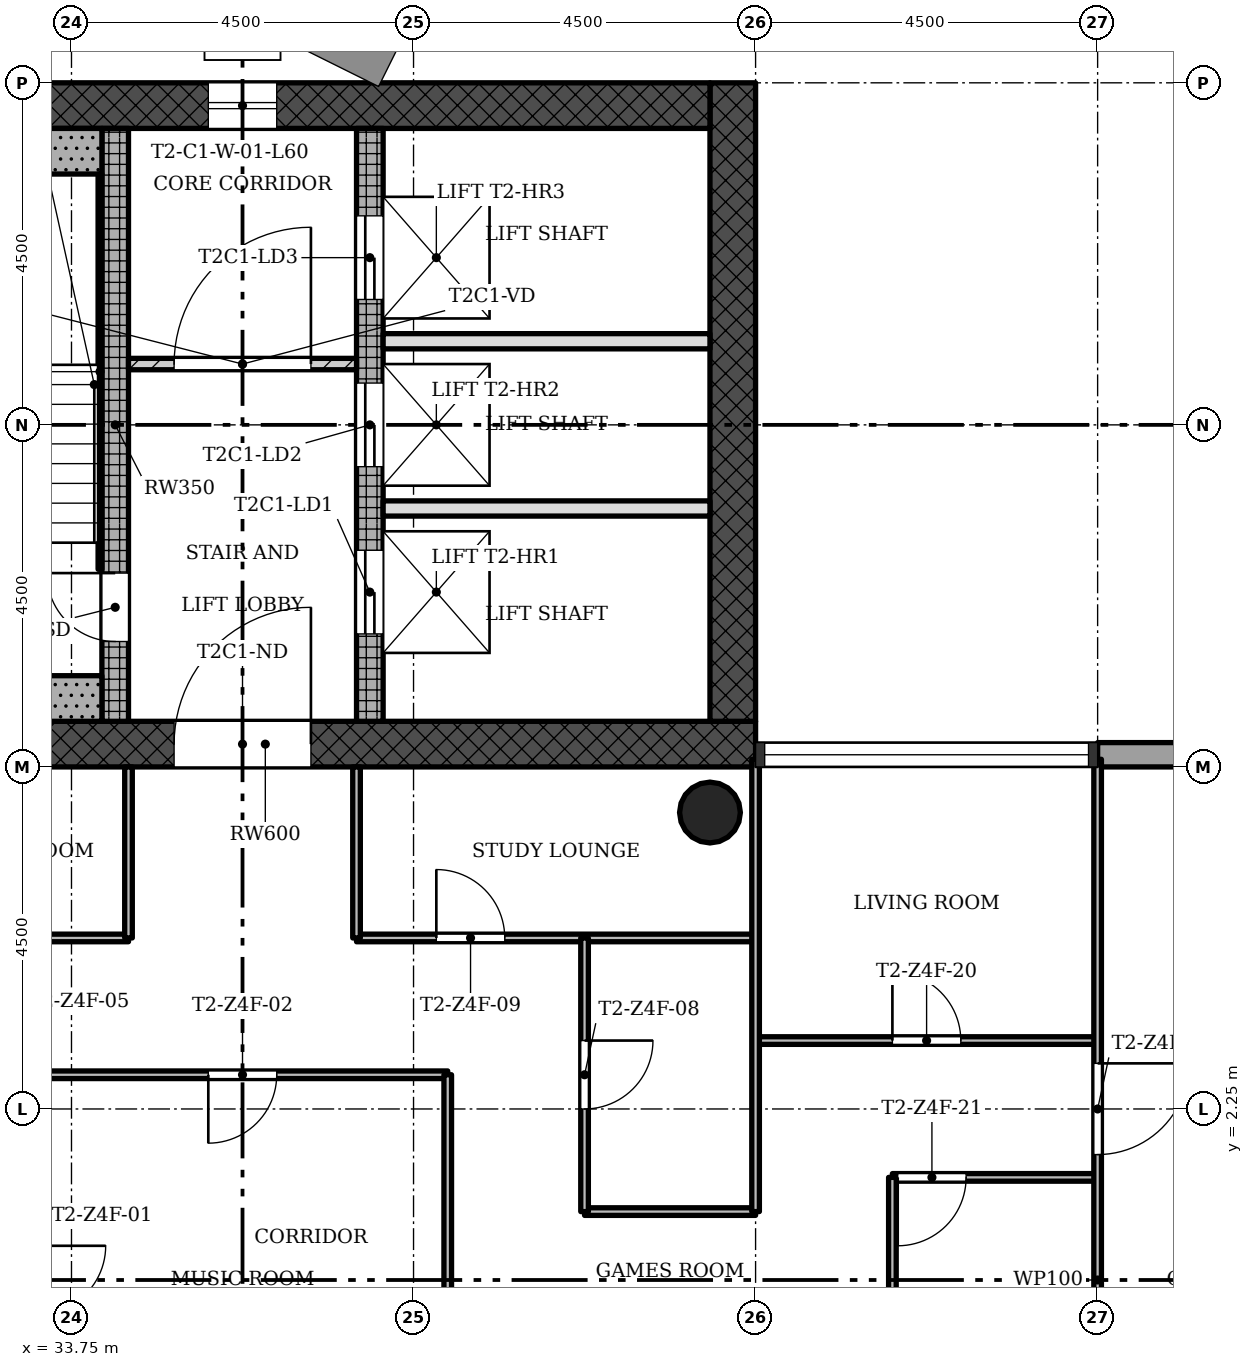
"""IFC4 building model, lengths in metres.
Left out: names, types, materials, properties, quantities, classifications, styles, units other than length and angle.
Written with IfcOpenShell. Run it as: python <this file> out.ifc"""

import sys

from ifc_helpers import new_model, si_unit, direction, frame, frame_2d, origin, origin_2d, place, context, subcontext, project, spatial, rectangle, hollow_circle, extrude, element, fill, save


model = new_model("IFC4")
c1 = context("Model", 3, precision=1e-05, world=origin(), true_north=direction((0.0, 1.0)))
c2 = subcontext(c1, "Body", "Model", "MODEL_VIEW")
j1 = project(units=[si_unit("LENGTHUNIT", "METRE"), si_unit("PLANEANGLEUNIT", "RADIAN")], contexts=[c1])
p1 = place(None, origin())
s1 = spatial("IfcSite", under=j1, at=p1, CompositionType="ELEMENT")
p2 = place(p1, origin())
s2 = spatial("IfcBuilding", under=s1, at=p2, CompositionType="ELEMENT")
p3 = place(p2, frame((0.0, 0.0, 216.4)))
s3 = spatial("IfcBuildingStorey", under=s2, at=p3, CompositionType="ELEMENT", Elevation=216.4)
p4 = place(p3, frame((29.85, 7.05, 0.0), z_axis=(0.0, 0.0, 1.0), x_axis=(1.0, 0.0, 0.0)))
e1 = element("IfcWall", 1, at=p4, inside=s3, PredefinedType="SHEAR", context=c2, shape_type="SweptSolid", body=[
    extrude(rectangle(XDim=12.9, YDim=0.6, at=frame_2d((6.45, 0.0))), origin(), (0.0, 0.0, 1.0), 3.4),
])
p5 = place(p4, frame((5.25, 0.0, 0.0)))
e2 = element("IfcOpeningElement", 2, at=p5, cuts=e1, PredefinedType="OPENING", context=c2, shape_type="SweptSolid", body=[
    extrude(rectangle(XDim=1.8, YDim=2.1, at=frame_2d((0.9, 1.05))), frame((0.0, 0.31, 0.0), z_axis=(0.0, -1.0, 0.0), x_axis=(1.0, 0.0, 0.0)), (0.0, 0.0, 1.0), 0.62),
])
p6 = place(p3, frame((42.45, 7.35, 0.0), z_axis=(0.0, 0.0, 1.0), x_axis=(0.0, 1.0, 0.0)))
e3 = element("IfcWall", 3, at=p6, inside=s3, PredefinedType="SHEAR", context=c2, shape_type="SweptSolid", body=[
    extrude(rectangle(XDim=8.4, YDim=0.6, at=frame_2d((4.2, 0.0))), origin(), (0.0, 0.0, 1.0), 3.4),
])
p7 = place(p3, frame((42.15, 15.45, 0.0), z_axis=(0.0, 0.0, 1.0), x_axis=(-1.0, 0.0, 0.0)))
e4 = element("IfcWall", 4, at=p7, inside=s3, PredefinedType="SHEAR", context=c2, shape_type="SweptSolid", body=[
    extrude(rectangle(XDim=12.9, YDim=0.6, at=frame_2d((6.45, 0.0))), origin(), (0.0, 0.0, 1.0), 3.4),
])
p8 = place(p7, frame((5.7, 0.0, 0.45)))
e5 = element("IfcOpeningElement", 5, at=p8, cuts=e4, PredefinedType="OPENING", context=c2, shape_type="SweptSolid", body=[
    extrude(rectangle(XDim=0.9, YDim=2.4, at=frame_2d((0.45, 1.2))), frame((0.0, 0.31, 0.0), z_axis=(0.0, -1.0, 0.0), x_axis=(1.0, 0.0, 0.0)), (0.0, 0.0, 1.0), 0.62),
])
p9 = place(p3, frame((34.325, 7.35, 0.0), z_axis=(0.0, 0.0, 1.0), x_axis=(0.0, 1.0, 0.0)))
e6 = element("IfcWall", 6, at=p9, inside=s3, PredefinedType="SHEAR", context=c2, shape_type="SweptSolid", body=[
    extrude(rectangle(XDim=7.8, YDim=0.35, at=frame_2d((3.9, 0.0))), origin(), (0.0, 0.0, 1.0), 3.4),
])
p10 = place(p9, frame((1.05, 0.0, 0.0)))
e7 = element("IfcOpeningElement", 7, at=p10, cuts=e6, PredefinedType="OPENING", context=c2, shape_type="SweptSolid", body=[
    extrude(rectangle(XDim=0.9, YDim=2.1, at=frame_2d((0.45, 1.05))), frame((0.0, 0.185, 0.0), z_axis=(0.0, -1.0, 0.0), x_axis=(1.0, 0.0, 0.0)), (0.0, 0.0, 1.0), 0.37),
])
p11 = place(p3, frame((37.675, 7.35, 0.0), z_axis=(0.0, 0.0, 1.0), x_axis=(0.0, 1.0, 0.0)))
e8 = element("IfcWall", 8, at=p11, inside=s3, PredefinedType="SHEAR", context=c2, shape_type="SweptSolid", body=[
    extrude(rectangle(XDim=7.8, YDim=0.35, at=frame_2d((3.9, 0.0))), origin(), (0.0, 0.0, 1.0), 3.4),
])
p12 = place(p11, frame((1.15, 0.0, 0.0)))
e9 = element("IfcOpeningElement", 9, at=p12, cuts=e8, PredefinedType="OPENING", context=c2, shape_type="SweptSolid", body=[
    extrude(rectangle(XDim=1.1, YDim=2.1, at=frame_2d((0.55, 1.05))), frame((0.0, 0.185, 0.0), z_axis=(0.0, -1.0, 0.0), x_axis=(1.0, 0.0, 0.0)), (0.0, 0.0, 1.0), 0.37),
])
p13 = place(p11, frame((3.35, 0.0, 0.0)))
e10 = element("IfcOpeningElement", 10, at=p13, cuts=e8, PredefinedType="OPENING", context=c2, shape_type="SweptSolid", body=[
    extrude(rectangle(XDim=1.1, YDim=2.1, at=frame_2d((0.55, 1.05))), frame((0.0, 0.185, 0.0), z_axis=(0.0, -1.0, 0.0), x_axis=(1.0, 0.0, 0.0)), (0.0, 0.0, 1.0), 0.37),
])
p14 = place(p11, frame((5.55, 0.0, 0.0)))
e11 = element("IfcOpeningElement", 11, at=p14, cuts=e8, PredefinedType="OPENING", context=c2, shape_type="SweptSolid", body=[
    extrude(rectangle(XDim=1.1, YDim=2.1, at=frame_2d((0.55, 1.05))), frame((0.0, 0.185, 0.0), z_axis=(0.0, -1.0, 0.0), x_axis=(1.0, 0.0, 0.0)), (0.0, 0.0, 1.0), 0.37),
])
p15 = place(p3, frame((42.15, 6.15, 0.0), z_axis=(0.0, 0.0, 1.0), x_axis=(1.0, 0.0, 0.0)))
e12 = element("IfcColumn", 12, at=p15, inside=s3, PredefinedType="COLUMN", context=c2, shape_type="SweptSolid", body=[
    extrude(hollow_circle(Radius=0.4, WallThickness=0.028, at=origin_2d()), origin(), (0.0, 0.0, 1.0), 3.4),
])
p16 = place(p3, frame((48.75, 6.91, -0.3), z_axis=(0.0, 0.0, 1.0), x_axis=(-1.0, 0.0, 0.0)))
e13 = element("IfcWall", 13, at=p16, inside=s3, PredefinedType="STANDARD", context=c2, shape_type="SweptSolid", body=[
    extrude(rectangle(XDim=1.5, YDim=0.32, at=frame_2d((0.75, 0.0))), origin(), (0.0, 0.0, 1.0), 3.4),
])
p17 = place(p3, frame((37.5, 12.05, 0.0), z_axis=(0.0, 0.0, 1.0), x_axis=(-1.0, 0.0, 0.0)))
e14 = element("IfcWall", 14, at=p17, inside=s3, PredefinedType="PARTITIONING", context=c2, shape_type="SweptSolid", body=[
    extrude(rectangle(XDim=3.0, YDim=0.15, at=frame_2d((1.5, 0.0))), origin(), (0.0, 0.0, 1.0), 3.0),
])
p18 = place(p17, frame((0.6, 0.0, 0.0)))
e15 = element("IfcOpeningElement", 15, at=p18, cuts=e14, PredefinedType="OPENING", context=c2, shape_type="SweptSolid", body=[
    extrude(rectangle(XDim=1.8, YDim=2.1, at=frame_2d((0.9, 1.05))), frame((0.0, 0.085, 0.0), z_axis=(0.0, -1.0, 0.0), x_axis=(1.0, 0.0, 0.0)), (0.0, 0.0, 1.0), 0.17),
])
for number, where, z_axis, x_axis in (
    (16, (42.15, 10.15, 0.0), (0.0, 0.0, 1.0), (-1.0, 0.0, 0.0)),
    (17, (42.15, 12.35, 0.0), (0.0, 0.0, 1.0), (-1.0, 0.0, 0.0)),
):
    element("IfcWall", number, at=place(p3, frame(where, z_axis=z_axis, x_axis=x_axis)), inside=s3, PredefinedType="SOLIDWALL", context=c2, shape_type="SweptSolid", body=[
        extrude(rectangle(XDim=4.3, YDim=0.2, at=frame_2d((2.15, 0.0))), origin(), (0.0, 0.0, 1.0), 3.0),
    ])
p19 = place(p3, frame((42.75, 0.9, 0.0), z_axis=(0.0, 0.0, 1.0), x_axis=(-1.0, 0.0, 0.0)))
e18 = element("IfcWall", 18, at=p19, inside=s3, PredefinedType="PARTITIONING", context=c2, shape_type="SweptSolid", body=[
    extrude(rectangle(XDim=2.25, YDim=0.1, at=frame_2d((1.125, 0.0))), origin(), (0.0, 0.0, 1.0), 3.0),
])
p20 = place(p3, frame((47.25, 1.35, 0.0), z_axis=(0.0, 0.0, 1.0), x_axis=(-1.0, 0.0, 0.0)))
e19 = element("IfcWall", 19, at=p20, inside=s3, PredefinedType="PARTITIONING", context=c2, shape_type="SweptSolid", body=[
    extrude(rectangle(XDim=2.7, YDim=0.1, at=frame_2d((1.35, 0.0))), origin(), (0.0, 0.0, 1.0), 3.0),
])
p21 = place(p20, frame((1.73, 0.0, 0.0)))
e20 = element("IfcOpeningElement", 20, at=p21, cuts=e19, PredefinedType="OPENING", context=c2, shape_type="SweptSolid", body=[
    extrude(rectangle(XDim=0.9, YDim=2.1, at=frame_2d((0.45, 1.05))), frame((0.0, 0.06, 0.0), z_axis=(0.0, -1.0, 0.0), x_axis=(1.0, 0.0, 0.0)), (0.0, 0.0, 1.0), 0.12),
])
p22 = place(p3, frame((38.7, 2.7, 0.0), z_axis=(0.0, 0.0, 1.0), x_axis=(-1.0, 0.0, 0.0)))
e21 = element("IfcWall", 21, at=p22, inside=s3, PredefinedType="PARTITIONING", context=c2, shape_type="SweptSolid", body=[
    extrude(rectangle(XDim=5.4, YDim=0.1, at=frame_2d((2.7, 0.0))), origin(), (0.0, 0.0, 1.0), 3.0),
])
p23 = place(p22, frame((2.25, 0.0, 0.0)))
e22 = element("IfcOpeningElement", 22, at=p23, cuts=e21, PredefinedType="OPENING", context=c2, shape_type="SweptSolid", body=[
    extrude(rectangle(XDim=0.9, YDim=2.1, at=frame_2d((0.45, 1.05))), frame((0.0, 0.06, 0.0), z_axis=(0.0, -1.0, 0.0), x_axis=(1.0, 0.0, 0.0)), (0.0, 0.0, 1.0), 0.12),
])
p24 = place(p3, frame((47.25, 3.15, 0.0), z_axis=(0.0, 0.0, 1.0), x_axis=(-1.0, 0.0, 0.0)))
e23 = element("IfcWall", 23, at=p24, inside=s3, PredefinedType="PARTITIONING", context=c2, shape_type="SweptSolid", body=[
    extrude(rectangle(XDim=4.5, YDim=0.1, at=frame_2d((2.25, 0.0))), origin(), (0.0, 0.0, 1.0), 3.0),
])
p25 = place(p24, frame((1.8, 0.0, 0.0)))
e24 = element("IfcOpeningElement", 24, at=p25, cuts=e23, PredefinedType="OPENING", context=c2, shape_type="SweptSolid", body=[
    extrude(rectangle(XDim=0.9, YDim=2.1, at=frame_2d((0.45, 1.05))), frame((0.0, 0.06, 0.0), z_axis=(0.0, -1.0, 0.0), x_axis=(1.0, 0.0, 0.0)), (0.0, 0.0, 1.0), 0.12),
])
p26 = place(p3, frame((42.75, 4.5, 0.0), z_axis=(0.0, 0.0, 1.0), x_axis=(-1.0, 0.0, 0.0)))
e25 = element("IfcWall", 25, at=p26, inside=s3, PredefinedType="PARTITIONING", context=c2, shape_type="SweptSolid", body=[
    extrude(rectangle(XDim=5.25, YDim=0.1, at=frame_2d((2.625, 0.0))), origin(), (0.0, 0.0, 1.0), 3.0),
])
p27 = place(p26, frame((3.3, 0.0, 0.0)))
e26 = element("IfcOpeningElement", 26, at=p27, cuts=e25, PredefinedType="OPENING", context=c2, shape_type="SweptSolid", body=[
    extrude(rectangle(XDim=0.9, YDim=2.1, at=frame_2d((0.45, 1.05))), frame((0.0, 0.06, 0.0), z_axis=(0.0, -1.0, 0.0), x_axis=(1.0, 0.0, 0.0)), (0.0, 0.0, 1.0), 0.12),
])
p28 = place(p3, frame((34.5, 4.5, 0.0), z_axis=(0.0, 0.0, 1.0), x_axis=(-1.0, 0.0, 0.0)))
e27 = element("IfcWall", 27, at=p28, inside=s3, PredefinedType="PARTITIONING", context=c2, shape_type="SweptSolid", body=[
    extrude(rectangle(XDim=3.0, YDim=0.1, at=frame_2d((1.5, 0.0))), origin(), (0.0, 0.0, 1.0), 3.0),
])
p29 = place(p28, frame((1.05, 0.0, 0.0)))
e28 = element("IfcOpeningElement", 28, at=p29, cuts=e27, PredefinedType="OPENING", context=c2, shape_type="SweptSolid", body=[
    extrude(rectangle(XDim=0.9, YDim=2.1, at=frame_2d((0.45, 1.05))), frame((0.0, 0.06, 0.0), z_axis=(0.0, -1.0, 0.0), x_axis=(1.0, 0.0, 0.0)), (0.0, 0.0, 1.0), 0.12),
])
p30 = place(p3, frame((47.25, -6.85, 0.0), z_axis=(0.0, 0.0, 1.0), x_axis=(0.0, 1.0, 0.0)))
e29 = element("IfcWall", 29, at=p30, inside=s3, PredefinedType="PARTITIONING", context=c2, shape_type="SweptSolid", body=[
    extrude(rectangle(XDim=13.7, YDim=0.1, at=frame_2d((6.85, 0.0))), origin(), (0.0, 0.0, 1.0), 3.0),
])
p31 = place(p30, frame((8.5, 0.0, 0.0)))
e30 = element("IfcOpeningElement", 30, at=p31, cuts=e29, PredefinedType="OPENING", context=c2, shape_type="SweptSolid", body=[
    extrude(rectangle(XDim=1.2, YDim=2.1, at=frame_2d((0.6, 1.05))), frame((0.0, 0.06, 0.0), z_axis=(0.0, -1.0, 0.0), x_axis=(1.0, 0.0, 0.0)), (0.0, 0.0, 1.0), 0.12),
])
p32 = place(p3, frame((44.55, -0.9, 0.0), z_axis=(0.0, 0.0, 1.0), x_axis=(0.0, 1.0, 0.0)))
e31 = element("IfcWall", 31, at=p32, inside=s3, PredefinedType="PARTITIONING", context=c2, shape_type="SweptSolid", body=[
    extrude(rectangle(XDim=2.25, YDim=0.1, at=frame_2d((1.125, 0.0))), origin(), (0.0, 0.0, 1.0), 3.0),
])
p33 = place(p3, frame((42.75, 0.9, 0.0), z_axis=(0.0, 0.0, 1.0), x_axis=(0.0, 1.0, 0.0)))
e32 = element("IfcWall", 32, at=p33, inside=s3, PredefinedType="PARTITIONING", context=c2, shape_type="SweptSolid", body=[
    extrude(rectangle(XDim=5.95, YDim=0.1, at=frame_2d((2.975, 0.0))), origin(), (0.0, 0.0, 1.0), 3.0),
])
p34 = place(p3, frame((40.5, 0.9, 0.0), z_axis=(0.0, 0.0, 1.0), x_axis=(0.0, 1.0, 0.0)))
e33 = element("IfcWall", 33, at=p34, inside=s3, PredefinedType="PARTITIONING", context=c2, shape_type="SweptSolid", body=[
    extrude(rectangle(XDim=3.6, YDim=0.1, at=frame_2d((1.8, 0.0))), origin(), (0.0, 0.0, 1.0), 3.0),
])
p35 = place(p34, frame((1.35, 0.0, 0.0)))
e34 = element("IfcOpeningElement", 34, at=p35, cuts=e33, PredefinedType="OPENING", context=c2, shape_type="SweptSolid", body=[
    extrude(rectangle(XDim=0.9, YDim=2.1, at=frame_2d((0.45, 1.05))), frame((0.0, 0.06, 0.0), z_axis=(0.0, -1.0, 0.0), x_axis=(1.0, 0.0, 0.0)), (0.0, 0.0, 1.0), 0.12),
])
p36 = place(p3, frame((38.7, -2.7, 0.0), z_axis=(0.0, 0.0, 1.0), x_axis=(0.0, 1.0, 0.0)))
e35 = element("IfcWall", 35, at=p36, inside=s3, PredefinedType="PARTITIONING", context=c2, shape_type="SweptSolid", body=[
    extrude(rectangle(XDim=5.4, YDim=0.1, at=frame_2d((2.7, 0.0))), origin(), (0.0, 0.0, 1.0), 3.0),
])
for number, where, z_axis, x_axis in (
    (36, (37.5, 4.5, 0.0), (0.0, 0.0, 1.0), (0.0, 1.0, 0.0)),
    (37, (34.5, 4.5, 0.0), (0.0, 0.0, 1.0), (0.0, 1.0, 0.0)),
):
    element("IfcWall", number, at=place(p3, frame(where, z_axis=z_axis, x_axis=x_axis)), inside=s3, PredefinedType="PARTITIONING", context=c2, shape_type="SweptSolid", body=[
        extrude(rectangle(XDim=2.25, YDim=0.1, at=frame_2d((1.125, 0.0))), origin(), (0.0, 0.0, 1.0), 3.0),
    ])
for number, where, z_axis, x_axis in (
    (38, (34.15, 14.85, 0.0), (0.0, 0.0, 1.0), (-1.0, 0.0, 0.0)),
    (39, (34.15, 7.65, 0.0), (0.0, 0.0, 1.0), (-1.0, 0.0, 0.0)),
):
    element("IfcWall", number, at=place(p3, frame(where, z_axis=z_axis, x_axis=x_axis)), inside=s3, PredefinedType="SHEAR", context=c2, shape_type="SweptSolid", body=[
        extrude(rectangle(XDim=4.3, YDim=0.6, at=frame_2d((2.15, 0.0))), origin(), (0.0, 0.0, 1.0), 3.4),
    ])
p37 = place(p3, frame((34.125, 9.35, 0.0), z_axis=(0.0, 0.0, 1.0), x_axis=(0.0, 1.0, 0.0)))
e40 = element("IfcWall", 40, at=p37, inside=s3, PredefinedType="SHEAR", context=c2, shape_type="SweptSolid", body=[
    extrude(rectangle(XDim=5.2, YDim=0.05, at=frame_2d((2.6, 0.0))), origin(), (0.0, 0.0, 1.0), 3.4),
])
p38 = place(p8, origin())
e41 = element("IfcWindow", 41, at=p38, inside=s3, PartitioningType="SINGLE_PANEL", PredefinedType="WINDOW", context=c2, shape_type="SweptSolid", body=[
    extrude(rectangle(XDim=0.9, YDim=2.4, at=frame_2d((0.45, 1.2))), frame((0.0, 0.03, 0.0), z_axis=(0.0, -1.0, 0.0), x_axis=(1.0, 0.0, 0.0)), (0.0, 0.0, 1.0), 0.06),
])
fill(e5, e41)
p39 = place(p18, origin())
e42 = element("IfcDoor", 42, at=p39, inside=s3, OperationType="SINGLE_SWING_LEFT", PredefinedType="DOOR", context=c2, shape_type="SweptSolid", body=[
    extrude(rectangle(XDim=1.8, YDim=2.1, at=frame_2d((0.9, 1.05))), frame((0.0, 0.025, 0.0), z_axis=(0.0, -1.0, 0.0), x_axis=(1.0, 0.0, 0.0)), (0.0, 0.0, 1.0), 0.05),
])
fill(e15, e42)
p40 = place(p23, origin())
e43 = element("IfcDoor", 43, at=p40, inside=s3, OperationType="SINGLE_SWING_LEFT", PredefinedType="DOOR", context=c2, shape_type="SweptSolid", body=[
    extrude(rectangle(XDim=0.9, YDim=2.1, at=frame_2d((0.45, 1.05))), frame((0.0, 0.025, 0.0), z_axis=(0.0, -1.0, 0.0), x_axis=(1.0, 0.0, 0.0)), (0.0, 0.0, 1.0), 0.05),
])
fill(e22, e43)
p41 = place(p35, origin())
e44 = element("IfcDoor", 44, at=p41, inside=s3, OperationType="SINGLE_SWING_RIGHT", PredefinedType="DOOR", context=c2, shape_type="SweptSolid", body=[
    extrude(rectangle(XDim=0.9, YDim=2.1, at=frame_2d((0.45, 1.05))), frame((0.0, 0.025, 0.0), z_axis=(0.0, -1.0, 0.0), x_axis=(1.0, 0.0, 0.0)), (0.0, 0.0, 1.0), 0.05),
])
fill(e34, e44)
p42 = place(p27, origin())
e45 = element("IfcDoor", 45, at=p42, inside=s3, OperationType="SINGLE_SWING_RIGHT", PredefinedType="DOOR", context=c2, shape_type="SweptSolid", body=[
    extrude(rectangle(XDim=0.9, YDim=2.1, at=frame_2d((0.45, 1.05))), frame((0.0, 0.025, 0.0), z_axis=(0.0, -1.0, 0.0), x_axis=(1.0, 0.0, 0.0)), (0.0, 0.0, 1.0), 0.05),
])
fill(e26, e45)
p43 = place(p25, origin())
e46 = element("IfcDoor", 46, at=p43, inside=s3, OperationType="SINGLE_SWING_RIGHT", PredefinedType="DOOR", context=c2, shape_type="SweptSolid", body=[
    extrude(rectangle(XDim=0.9, YDim=2.1, at=frame_2d((0.45, 1.05))), frame((0.0, 0.025, 0.0), z_axis=(0.0, -1.0, 0.0), x_axis=(1.0, 0.0, 0.0)), (0.0, 0.0, 1.0), 0.05),
])
fill(e24, e46)
p44 = place(p21, origin())
e47 = element("IfcDoor", 47, at=p44, inside=s3, OperationType="SINGLE_SWING_LEFT", PredefinedType="DOOR", context=c2, shape_type="SweptSolid", body=[
    extrude(rectangle(XDim=0.9, YDim=2.1, at=frame_2d((0.45, 1.05))), frame((0.0, 0.025, 0.0), z_axis=(0.0, -1.0, 0.0), x_axis=(1.0, 0.0, 0.0)), (0.0, 0.0, 1.0), 0.05),
])
fill(e20, e47)
p45 = place(p31, origin())
e48 = element("IfcDoor", 48, at=p45, inside=s3, OperationType="SINGLE_SWING_RIGHT", PredefinedType="DOOR", context=c2, shape_type="SweptSolid", body=[
    extrude(rectangle(XDim=1.2, YDim=2.1, at=frame_2d((0.6, 1.05))), frame((0.0, 0.025, 0.0), z_axis=(0.0, -1.0, 0.0), x_axis=(1.0, 0.0, 0.0)), (0.0, 0.0, 1.0), 0.05),
])
fill(e30, e48)
p46 = place(p10, origin())
e49 = element("IfcDoor", 49, at=p46, inside=s3, OperationType="SINGLE_SWING_LEFT", PredefinedType="DOOR", context=c2, shape_type="SweptSolid", body=[
    extrude(rectangle(XDim=0.9, YDim=2.1, at=frame_2d((0.45, 1.05))), frame((0.0, 0.025, 0.0), z_axis=(0.0, -1.0, 0.0), x_axis=(1.0, 0.0, 0.0)), (0.0, 0.0, 1.0), 0.05),
])
fill(e7, e49)
p47 = place(p12, origin())
e50 = element("IfcDoor", 50, at=p47, inside=s3, OperationType="SLIDING_TO_LEFT", PredefinedType="DOOR", context=c2, shape_type="SweptSolid", body=[
    extrude(rectangle(XDim=1.1, YDim=2.1, at=frame_2d((0.55, 1.05))), frame((0.0, 0.025, 0.0), z_axis=(0.0, -1.0, 0.0), x_axis=(1.0, 0.0, 0.0)), (0.0, 0.0, 1.0), 0.05),
])
fill(e9, e50)
p48 = place(p13, origin())
e51 = element("IfcDoor", 51, at=p48, inside=s3, OperationType="SLIDING_TO_LEFT", PredefinedType="DOOR", context=c2, shape_type="SweptSolid", body=[
    extrude(rectangle(XDim=1.1, YDim=2.1, at=frame_2d((0.55, 1.05))), frame((0.0, 0.025, 0.0), z_axis=(0.0, -1.0, 0.0), x_axis=(1.0, 0.0, 0.0)), (0.0, 0.0, 1.0), 0.05),
])
fill(e10, e51)
p49 = place(p14, origin())
e52 = element("IfcDoor", 52, at=p49, inside=s3, OperationType="SLIDING_TO_LEFT", PredefinedType="DOOR", context=c2, shape_type="SweptSolid", body=[
    extrude(rectangle(XDim=1.1, YDim=2.1, at=frame_2d((0.55, 1.05))), frame((0.0, 0.025, 0.0), z_axis=(0.0, -1.0, 0.0), x_axis=(1.0, 0.0, 0.0)), (0.0, 0.0, 1.0), 0.05),
])
fill(e11, e52)
p50 = place(p5, origin())
e53 = element("IfcDoor", 53, at=p50, inside=s3, OperationType="SINGLE_SWING_LEFT", PredefinedType="DOOR", context=c2, shape_type="SweptSolid", body=[
    extrude(rectangle(XDim=1.8, YDim=2.1, at=frame_2d((0.9, 1.05))), frame((0.0, 0.025, 0.0), z_axis=(0.0, -1.0, 0.0), x_axis=(1.0, 0.0, 0.0)), (0.0, 0.0, 1.0), 0.05),
])
fill(e2, e53)
save(model, sys.argv[1])
